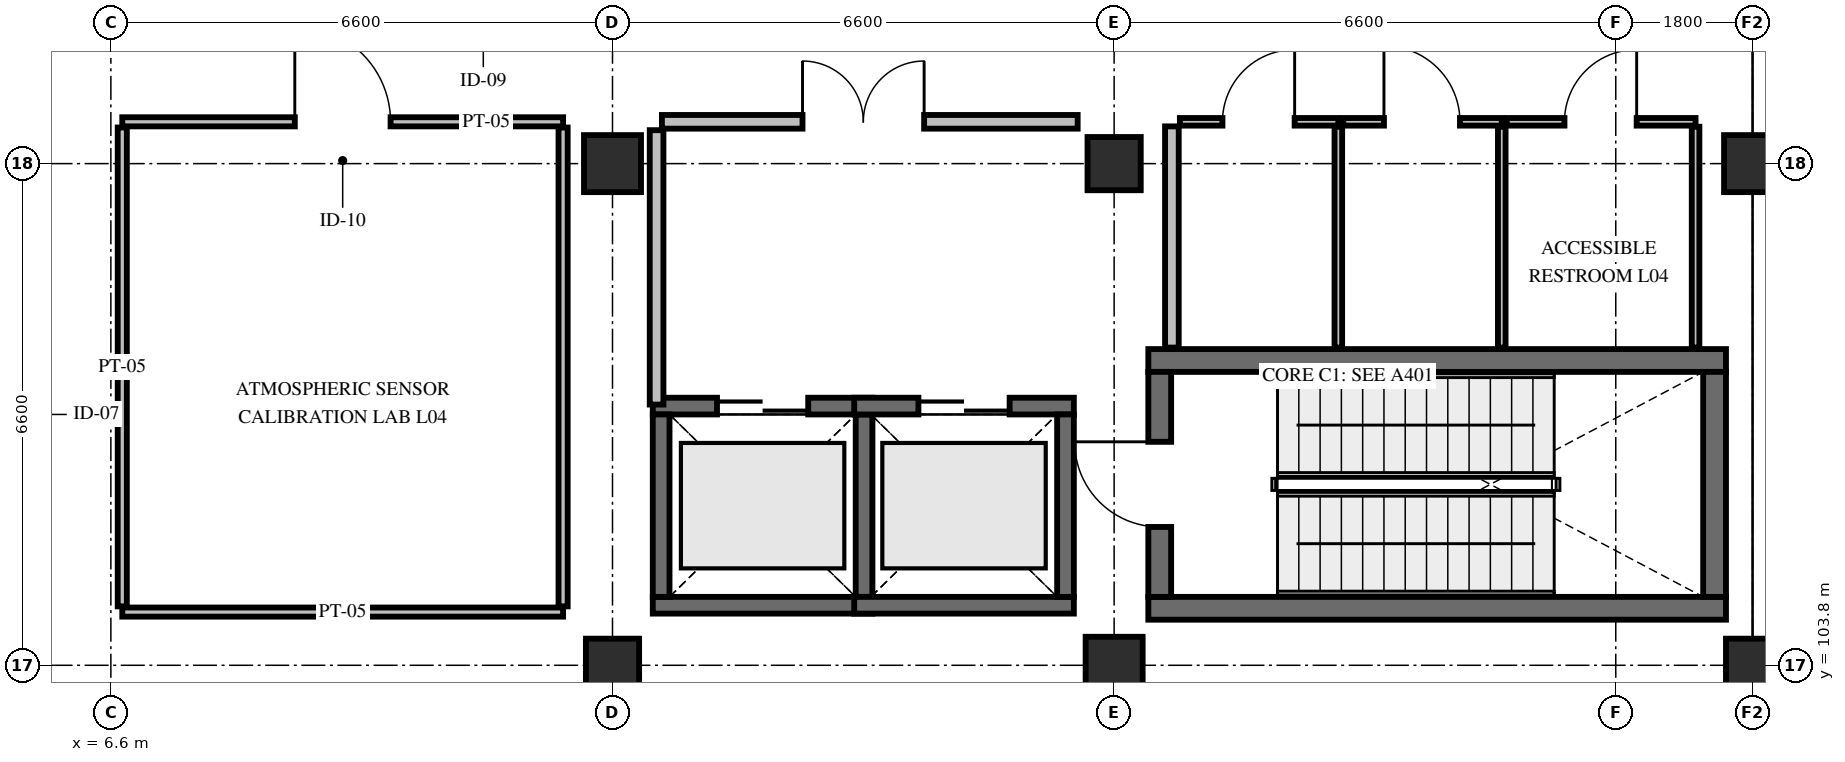
"""IFC4 building model, lengths in metres.
Left out: names, types, materials, properties, quantities, classifications, styles, units other than length and angle.
Written with IfcOpenShell. Run it as: python <this file> out.ifc"""

import sys

from ifc_helpers import new_model, si_unit, direction, frame, frame_2d, origin, origin_2d, place, context, subcontext, project, spatial, rectangle, extrude, element, fill, save


model = new_model("IFC4")
c1 = context("Model", 3, precision=1e-05, world=origin(), true_north=direction((0.0, 1.0)))
c2 = subcontext(c1, "Body", "Model", "MODEL_VIEW")
j1 = project(units=[si_unit("LENGTHUNIT", "METRE"), si_unit("PLANEANGLEUNIT", "RADIAN")], contexts=[c1])
p1 = place(None, origin())
s1 = spatial("IfcSite", under=j1, at=p1, CompositionType="ELEMENT")
p2 = place(p1, origin())
s2 = spatial("IfcBuilding", under=s1, at=p2, CompositionType="ELEMENT")
p3 = place(p2, frame((0.0, 0.0, 19.8)))
s3 = spatial("IfcBuildingStorey", under=s2, at=p3, CompositionType="ELEMENT", Elevation=19.8)
p4 = place(p3, frame((13.2, 103.8, 0.0), z_axis=(0.0, 0.0, 1.0), x_axis=(1.0, 0.0, 0.0)))
e1 = element("IfcColumn", 1, at=p4, inside=s3, PredefinedType="COLUMN", context=c2, shape_type="SweptSolid", body=[
    extrude(rectangle(XDim=0.7, YDim=0.7, at=origin_2d()), origin(), (0.0, 0.0, 1.0), 4.8),
])
for number, where, z_axis, x_axis in (
    (2, (13.2, 110.4, 0.0), (0.0, 0.0, 1.0), (1.0, 0.0, 0.0)),
    (3, (19.8, 103.8, 0.0), (0.0, 0.0, 1.0), (1.0, 0.0, 0.0)),
):
    element("IfcColumn", number, at=place(p3, frame(where, z_axis=z_axis, x_axis=x_axis)), inside=s3, PredefinedType="COLUMN", context=c2, shape_type="SweptSolid", body=[
        extrude(rectangle(XDim=0.75, YDim=0.75, at=origin_2d()), origin(), (0.0, 0.0, 1.0), 4.8),
    ])
for number, where, z_axis, x_axis in (
    (4, (19.8, 110.4, 0.0), (0.0, 0.0, 1.0), (1.0, 0.0, 0.0)),
    (5, (28.2, 103.8, 0.0), (0.0, 0.0, 1.0), (1.0, 0.0, 0.0)),
):
    element("IfcColumn", number, at=place(p3, frame(where, z_axis=z_axis, x_axis=x_axis)), inside=s3, PredefinedType="COLUMN", context=c2, shape_type="SweptSolid", body=[
        extrude(rectangle(XDim=0.7, YDim=0.7, at=origin_2d()), origin(), (0.0, 0.0, 1.0), 4.8),
    ])
p5 = place(p3, frame((28.2, 110.4, 0.0), z_axis=(0.0, 0.0, 1.0), x_axis=(1.0, 0.0, 0.0)))
e6 = element("IfcColumn", 6, at=p5, inside=s3, PredefinedType="COLUMN", context=c2, shape_type="SweptSolid", body=[
    extrude(rectangle(XDim=0.75, YDim=0.75, at=origin_2d()), origin(), (0.0, 0.0, 1.0), 4.8),
])
for number, where, z_axis, x_axis in (
    (7, (20.25, 104.55, 0.0), (0.0, 0.0, 1.0), (1.0, 0.0, 0.0)),
    (8, (20.25, 107.81, 0.0), (0.0, 0.0, 1.0), (1.0, 0.0, 0.0)),
):
    element("IfcWall", number, at=place(p3, frame(where, z_axis=z_axis, x_axis=x_axis)), inside=s3, PredefinedType="SHEAR", context=c2, shape_type="SweptSolid", body=[
        extrude(rectangle(XDim=7.6, YDim=0.3, at=frame_2d((3.8, 0.0))), origin(), (0.0, 0.0, 1.0), 4.5),
    ])
p6 = place(p3, frame((20.4, 104.7, 0.0), z_axis=(0.0, 0.0, 1.0), x_axis=(0.0, 1.0, 0.0)))
e9 = element("IfcWall", 9, at=p6, inside=s3, PredefinedType="SHEAR", context=c2, shape_type="SweptSolid", body=[
    extrude(rectangle(XDim=2.96, YDim=0.3, at=frame_2d((1.48, 0.0))), origin(), (0.0, 0.0, 1.0), 4.5),
])
p7 = place(p6, frame((0.92, 0.0, 0.0)))
e10 = element("IfcOpeningElement", 10, at=p7, cuts=e9, PredefinedType="OPENING", context=c2, shape_type="SweptSolid", body=[
    extrude(rectangle(XDim=1.12, YDim=2.2, at=frame_2d((0.56, 1.1))), frame((0.0, 0.165, 0.0), z_axis=(0.0, -1.0, 0.0), x_axis=(1.0, 0.0, 0.0)), (0.0, 0.0, 1.0), 0.33),
])
p8 = place(p3, frame((27.7, 104.7, 0.0), z_axis=(0.0, 0.0, 1.0), x_axis=(0.0, 1.0, 0.0)))
e11 = element("IfcWall", 11, at=p8, inside=s3, PredefinedType="SHEAR", context=c2, shape_type="SweptSolid", body=[
    extrude(rectangle(XDim=2.96, YDim=0.3, at=frame_2d((1.48, 0.0))), origin(), (0.0, 0.0, 1.0), 4.5),
])
p9 = place(p3, frame((13.73, 104.59, 0.0), z_axis=(0.0, 0.0, 1.0), x_axis=(1.0, 0.0, 0.0)))
e12 = element("IfcWall", 12, at=p9, inside=s3, PredefinedType="SHEAR", context=c2, shape_type="SweptSolid", body=[
    extrude(rectangle(XDim=2.89, YDim=0.22, at=frame_2d((1.445, 0.0))), origin(), (0.0, 0.0, 1.0), 4.5),
])
p10 = place(p3, frame((13.73, 107.21, 0.0), z_axis=(0.0, 0.0, 1.0), x_axis=(1.0, 0.0, 0.0)))
e13 = element("IfcWall", 13, at=p10, inside=s3, PredefinedType="SHEAR", context=c2, shape_type="SweptSolid", body=[
    extrude(rectangle(XDim=2.89, YDim=0.22, at=frame_2d((1.445, 0.0))), origin(), (0.0, 0.0, 1.0), 4.5),
])
p11 = place(p10, frame((0.845, 0.0, 0.0)))
e14 = element("IfcOpeningElement", 14, at=p11, cuts=e13, PredefinedType="OPENING", context=c2, shape_type="SweptSolid", body=[
    extrude(rectangle(XDim=1.2, YDim=2.2, at=frame_2d((0.6, 1.1))), frame((0.0, 0.125, 0.0), z_axis=(0.0, -1.0, 0.0), x_axis=(1.0, 0.0, 0.0)), (0.0, 0.0, 1.0), 0.25),
])
for number, where, z_axis, x_axis in (
    (15, (13.84, 104.7, 0.0), (0.0, 0.0, 1.0), (0.0, 1.0, 0.0)),
    (16, (16.51, 104.7, 0.0), (0.0, 0.0, 1.0), (0.0, 1.0, 0.0)),
):
    element("IfcWall", number, at=place(p3, frame(where, z_axis=z_axis, x_axis=x_axis)), inside=s3, PredefinedType="SHEAR", context=c2, shape_type="SweptSolid", body=[
        extrude(rectangle(XDim=2.4, YDim=0.22, at=frame_2d((1.2, 0.0))), origin(), (0.0, 0.0, 1.0), 4.5),
    ])
p12 = place(p3, frame((16.38, 104.59, 0.0), z_axis=(0.0, 0.0, 1.0), x_axis=(1.0, 0.0, 0.0)))
e17 = element("IfcWall", 17, at=p12, inside=s3, PredefinedType="SHEAR", context=c2, shape_type="SweptSolid", body=[
    extrude(rectangle(XDim=2.89, YDim=0.22, at=frame_2d((1.445, 0.0))), origin(), (0.0, 0.0, 1.0), 4.5),
])
p13 = place(p3, frame((16.38, 107.21, 0.0), z_axis=(0.0, 0.0, 1.0), x_axis=(1.0, 0.0, 0.0)))
e18 = element("IfcWall", 18, at=p13, inside=s3, PredefinedType="SHEAR", context=c2, shape_type="SweptSolid", body=[
    extrude(rectangle(XDim=2.89, YDim=0.22, at=frame_2d((1.445, 0.0))), origin(), (0.0, 0.0, 1.0), 4.5),
])
p14 = place(p13, frame((0.845, 0.0, 0.0)))
e19 = element("IfcOpeningElement", 19, at=p14, cuts=e18, PredefinedType="OPENING", context=c2, shape_type="SweptSolid", body=[
    extrude(rectangle(XDim=1.2, YDim=2.2, at=frame_2d((0.6, 1.1))), frame((0.0, 0.125, 0.0), z_axis=(0.0, -1.0, 0.0), x_axis=(1.0, 0.0, 0.0)), (0.0, 0.0, 1.0), 0.25),
])
p15 = place(p3, frame((19.16, 104.7, 0.0), z_axis=(0.0, 0.0, 1.0), x_axis=(0.0, 1.0, 0.0)))
e20 = element("IfcWall", 20, at=p15, inside=s3, PredefinedType="SHEAR", context=c2, shape_type="SweptSolid", body=[
    extrude(rectangle(XDim=2.4, YDim=0.22, at=frame_2d((1.2, 0.0))), origin(), (0.0, 0.0, 1.0), 4.5),
])
p16 = place(p3, frame((13.85, 110.95, 0.0), z_axis=(0.0, 0.0, 1.0), x_axis=(1.0, 0.0, 0.0)))
e21 = element("IfcWall", 21, at=p16, inside=s3, PredefinedType="PARTITIONING", context=c2, shape_type="SweptSolid", body=[
    extrude(rectangle(XDim=5.47, YDim=0.18, at=frame_2d((2.735, 0.0))), origin(), (0.0, 0.0, 1.0), 4.345),
])
p17 = place(p16, frame((1.85, 0.0, 0.0)))
e22 = element("IfcOpeningElement", 22, at=p17, cuts=e21, PredefinedType="OPENING", context=c2, shape_type="SweptSolid", body=[
    extrude(rectangle(XDim=1.6, YDim=2.25, at=frame_2d((0.8, 1.125))), frame((0.0, 0.105, 0.0), z_axis=(0.0, -1.0, 0.0), x_axis=(1.0, 0.0, 0.0)), (0.0, 0.0, 1.0), 0.21),
])
p18 = place(p3, frame((13.78, 107.23, 0.0), z_axis=(0.0, 0.0, 1.0), x_axis=(0.0, 1.0, 0.0)))
e23 = element("IfcWall", 23, at=p18, inside=s3, PredefinedType="PARTITIONING", context=c2, shape_type="SweptSolid", body=[
    extrude(rectangle(XDim=3.61, YDim=0.18, at=frame_2d((1.805, 0.0))), origin(), (0.0, 0.0, 1.0), 4.18),
])
p19 = place(p3, frame((20.56, 107.98, 0.0), z_axis=(0.0, 0.0, 1.0), x_axis=(0.0, 1.0, 0.0)))
e24 = element("IfcWall", 24, at=p19, inside=s3, PredefinedType="PARTITIONING", context=c2, shape_type="SweptSolid", body=[
    extrude(rectangle(XDim=2.91, YDim=0.18, at=frame_2d((1.455, 0.0))), origin(), (0.0, 0.0, 1.0), 3.83),
])
p20 = place(p3, frame((20.665, 110.95, 0.0), z_axis=(0.0, 0.0, 1.0), x_axis=(1.0, 0.0, 0.0)))
e25 = element("IfcWall", 25, at=p20, inside=s3, PredefinedType="PARTITIONING", context=c2, shape_type="SweptSolid", body=[
    extrude(rectangle(XDim=2.085, YDim=0.1, at=frame_2d((1.042, 0.0))), origin(), (0.0, 0.0, 1.0), 4.345),
])
p21 = place(p20, frame((0.56, 0.0, 0.0)))
e26 = element("IfcOpeningElement", 26, at=p21, cuts=e25, PredefinedType="OPENING", context=c2, shape_type="SweptSolid", body=[
    extrude(rectangle(XDim=0.95, YDim=2.15, at=frame_2d((0.475, 1.075))), frame((0.0, 0.065, 0.0), z_axis=(0.0, -1.0, 0.0), x_axis=(1.0, 0.0, 0.0)), (0.0, 0.0, 1.0), 0.13),
])
p22 = place(p3, frame((22.75, 107.98, 0.0), z_axis=(0.0, 0.0, 1.0), x_axis=(0.0, 1.0, 0.0)))
e27 = element("IfcWall", 27, at=p22, inside=s3, PredefinedType="PARTITIONING", context=c2, shape_type="SweptSolid", body=[
    extrude(rectangle(XDim=2.905, YDim=0.1, at=frame_2d((1.453, 0.0))), origin(), (0.0, 0.0, 1.0), 3.83),
])
p23 = place(p3, frame((22.815, 110.95, 0.0), z_axis=(0.0, 0.0, 1.0), x_axis=(1.0, 0.0, 0.0)))
e28 = element("IfcWall", 28, at=p23, inside=s3, PredefinedType="PARTITIONING", context=c2, shape_type="SweptSolid", body=[
    extrude(rectangle(XDim=2.085, YDim=0.1, at=frame_2d((1.042, 0.0))), origin(), (0.0, 0.0, 1.0), 4.48),
])
p24 = place(p23, frame((0.535, 0.0, 0.0)))
e29 = element("IfcOpeningElement", 29, at=p24, cuts=e28, PredefinedType="OPENING", context=c2, shape_type="SweptSolid", body=[
    extrude(rectangle(XDim=1.0, YDim=2.15, at=frame_2d((0.5, 1.075))), frame((0.0, 0.065, 0.0), z_axis=(0.0, -1.0, 0.0), x_axis=(1.0, 0.0, 0.0)), (0.0, 0.0, 1.0), 0.13),
])
p25 = place(p3, frame((24.9, 107.98, 0.0), z_axis=(0.0, 0.0, 1.0), x_axis=(0.0, 1.0, 0.0)))
e30 = element("IfcWall", 30, at=p25, inside=s3, PredefinedType="PARTITIONING", context=c2, shape_type="SweptSolid", body=[
    extrude(rectangle(XDim=2.905, YDim=0.1, at=frame_2d((1.453, 0.0))), origin(), (0.0, 0.0, 1.0), 3.83),
])
p26 = place(p3, frame((24.965, 110.95, 0.0), z_axis=(0.0, 0.0, 1.0), x_axis=(1.0, 0.0, 0.0)))
e31 = element("IfcWall", 31, at=p26, inside=s3, PredefinedType="PARTITIONING", context=c2, shape_type="SweptSolid", body=[
    extrude(rectangle(XDim=2.485, YDim=0.1, at=frame_2d((1.242, 0.0))), origin(), (0.0, 0.0, 1.0), 4.345),
])
p27 = place(p26, frame((0.76, 0.0, 0.0)))
e32 = element("IfcOpeningElement", 32, at=p27, cuts=e31, PredefinedType="OPENING", context=c2, shape_type="SweptSolid", body=[
    extrude(rectangle(XDim=0.95, YDim=2.15, at=frame_2d((0.475, 1.075))), frame((0.0, 0.065, 0.0), z_axis=(0.0, -1.0, 0.0), x_axis=(1.0, 0.0, 0.0)), (0.0, 0.0, 1.0), 0.13),
])
p28 = place(p3, frame((27.45, 107.98, 0.0), z_axis=(0.0, 0.0, 1.0), x_axis=(0.0, 1.0, 0.0)))
e33 = element("IfcWall", 33, at=p28, inside=s3, PredefinedType="PARTITIONING", context=c2, shape_type="SweptSolid", body=[
    extrude(rectangle(XDim=2.905, YDim=0.1, at=frame_2d((1.453, 0.0))), origin(), (0.0, 0.0, 1.0), 3.83),
])
p29 = place(p3, frame((6.75, 104.5, 0.0), z_axis=(0.0, 0.0, 1.0), x_axis=(1.0, 0.0, 0.0)))
e34 = element("IfcWall", 34, at=p29, inside=s3, PredefinedType="PARTITIONING", context=c2, shape_type="SweptSolid", body=[
    extrude(rectangle(XDim=5.8, YDim=0.12, at=frame_2d((2.9, 0.0))), origin(), (0.0, 0.0, 1.0), 4.345),
])
p30 = place(p3, frame((6.75, 110.95, 0.0), z_axis=(0.0, 0.0, 1.0), x_axis=(1.0, 0.0, 0.0)))
e35 = element("IfcWall", 35, at=p30, inside=s3, PredefinedType="PARTITIONING", context=c2, shape_type="SweptSolid", body=[
    extrude(rectangle(XDim=5.8, YDim=0.12, at=frame_2d((2.9, 0.0))), origin(), (0.0, 0.0, 1.0), 4.345),
])
p31 = place(p30, frame((2.27, 0.0, 0.0)))
e36 = element("IfcOpeningElement", 36, at=p31, cuts=e35, PredefinedType="OPENING", context=c2, shape_type="SweptSolid", body=[
    extrude(rectangle(XDim=1.26, YDim=2.2, at=frame_2d((0.63, 1.1))), frame((0.0, 0.075, 0.0), z_axis=(0.0, -1.0, 0.0), x_axis=(1.0, 0.0, 0.0)), (0.0, 0.0, 1.0), 0.15),
])
for number, where, z_axis, x_axis in (
    (37, (6.75, 104.575, 0.0), (0.0, 0.0, 1.0), (0.0, 1.0, 0.0)),
    (38, (12.55, 104.575, 0.0), (0.0, 0.0, 1.0), (0.0, 1.0, 0.0)),
):
    element("IfcWall", number, at=place(p3, frame(where, z_axis=z_axis, x_axis=x_axis)), inside=s3, PredefinedType="PARTITIONING", context=c2, shape_type="SweptSolid", body=[
        extrude(rectangle(XDim=6.3, YDim=0.12, at=frame_2d((3.15, 0.0))), origin(), (0.0, 0.0, 1.0), 3.83),
    ])
p32 = place(p7, origin())
e39 = element("IfcDoor", 39, at=p32, inside=s3, OperationType="SINGLE_SWING_RIGHT", PredefinedType="DOOR", context=c2, shape_type="SweptSolid", body=[
    extrude(rectangle(XDim=1.12, YDim=2.2, at=frame_2d((0.56, 1.1))), frame((0.0, 0.025, 0.0), z_axis=(0.0, -1.0, 0.0), x_axis=(1.0, 0.0, 0.0)), (0.0, 0.0, 1.0), 0.05),
])
fill(e10, e39)
p33 = place(p11, origin())
e40 = element("IfcDoor", 40, at=p33, inside=s3, OperationType="DOUBLE_DOOR_SLIDING", PredefinedType="DOOR", context=c2, shape_type="SweptSolid", body=[
    extrude(rectangle(XDim=1.2, YDim=2.2, at=frame_2d((0.6, 1.1))), frame((0.0, 0.025, 0.0), z_axis=(0.0, -1.0, 0.0), x_axis=(1.0, 0.0, 0.0)), (0.0, 0.0, 1.0), 0.05),
])
fill(e14, e40)
p34 = place(p14, origin())
e41 = element("IfcDoor", 41, at=p34, inside=s3, OperationType="DOUBLE_DOOR_SLIDING", PredefinedType="DOOR", context=c2, shape_type="SweptSolid", body=[
    extrude(rectangle(XDim=1.2, YDim=2.2, at=frame_2d((0.6, 1.1))), frame((0.0, 0.025, 0.0), z_axis=(0.0, -1.0, 0.0), x_axis=(1.0, 0.0, 0.0)), (0.0, 0.0, 1.0), 0.05),
])
fill(e19, e41)
p35 = place(p17, origin())
e42 = element("IfcDoor", 42, at=p35, inside=s3, OperationType="DOUBLE_DOOR_SINGLE_SWING", PredefinedType="DOOR", context=c2, shape_type="SweptSolid", body=[
    extrude(rectangle(XDim=1.6, YDim=2.25, at=frame_2d((0.8, 1.125))), frame((0.0, 0.025, 0.0), z_axis=(0.0, -1.0, 0.0), x_axis=(1.0, 0.0, 0.0)), (0.0, 0.0, 1.0), 0.05),
])
fill(e22, e42)
p36 = place(p21, origin())
e43 = element("IfcDoor", 43, at=p36, inside=s3, OperationType="SINGLE_SWING_RIGHT", PredefinedType="DOOR", context=c2, shape_type="SweptSolid", body=[
    extrude(rectangle(XDim=0.95, YDim=2.15, at=frame_2d((0.475, 1.075))), frame((0.0, 0.025, 0.0), z_axis=(0.0, -1.0, 0.0), x_axis=(1.0, 0.0, 0.0)), (0.0, 0.0, 1.0), 0.05),
])
fill(e26, e43)
p37 = place(p24, origin())
e44 = element("IfcDoor", 44, at=p37, inside=s3, OperationType="SINGLE_SWING_LEFT", PredefinedType="DOOR", context=c2, shape_type="SweptSolid", body=[
    extrude(rectangle(XDim=1.0, YDim=2.15, at=frame_2d((0.5, 1.075))), frame((0.0, 0.025, 0.0), z_axis=(0.0, -1.0, 0.0), x_axis=(1.0, 0.0, 0.0)), (0.0, 0.0, 1.0), 0.05),
])
fill(e29, e44)
p38 = place(p27, origin())
e45 = element("IfcDoor", 45, at=p38, inside=s3, OperationType="SINGLE_SWING_RIGHT", PredefinedType="DOOR", context=c2, shape_type="SweptSolid", body=[
    extrude(rectangle(XDim=0.95, YDim=2.15, at=frame_2d((0.475, 1.075))), frame((0.0, 0.025, 0.0), z_axis=(0.0, -1.0, 0.0), x_axis=(1.0, 0.0, 0.0)), (0.0, 0.0, 1.0), 0.05),
])
fill(e32, e45)
p39 = place(p31, origin())
e46 = element("IfcDoor", 46, at=p39, inside=s3, OperationType="SINGLE_SWING_LEFT", PredefinedType="DOOR", context=c2, shape_type="SweptSolid", body=[
    extrude(rectangle(XDim=1.26, YDim=2.2, at=frame_2d((0.63, 1.1))), frame((0.0, 0.025, 0.0), z_axis=(0.0, -1.0, 0.0), x_axis=(1.0, 0.0, 0.0)), (0.0, 0.0, 1.0), 0.05),
])
fill(e36, e46)
save(model, sys.argv[1])
